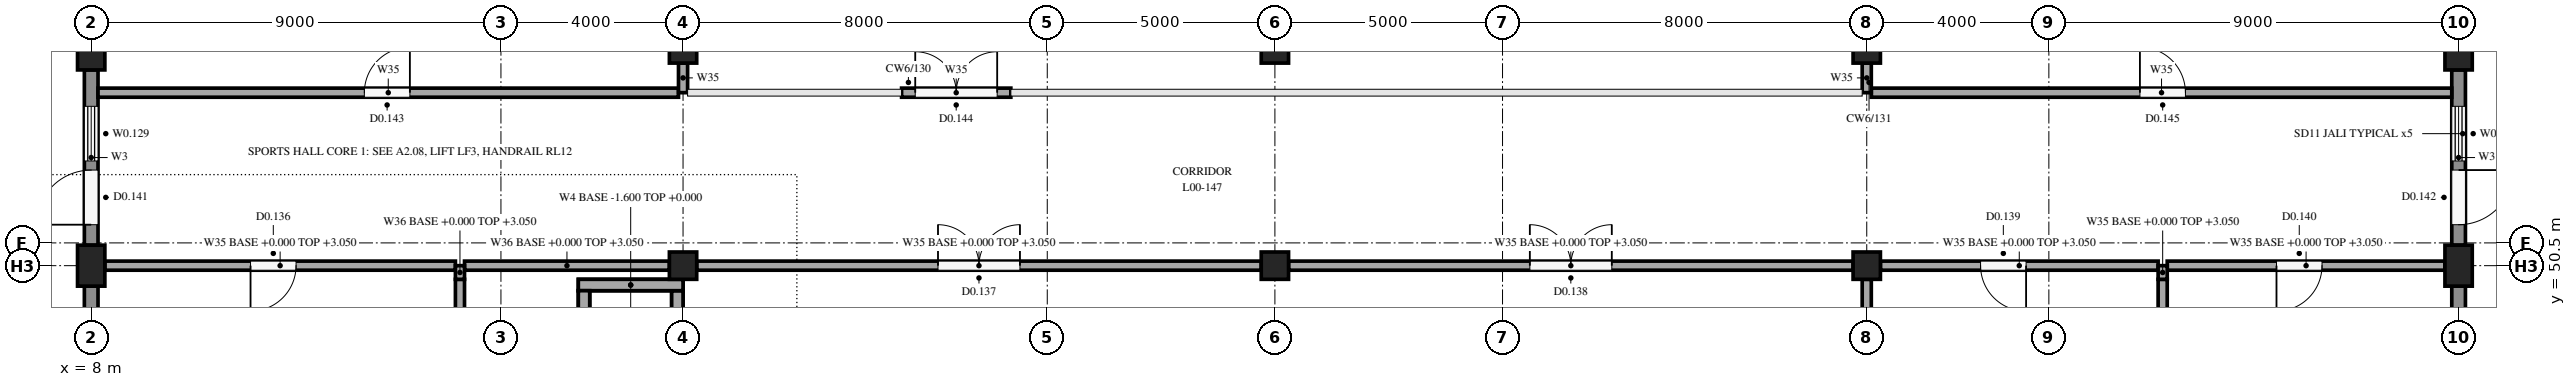
"""IFC4 building model, lengths in metres.
Left out: names, types, materials, properties, quantities, classifications, styles, units other than length and angle.
Written with IfcOpenShell. Run it as: python <this file> out.ifc"""

import sys

from ifc_helpers import new_model, si_unit, direction, frame, frame_2d, origin, origin_2d, place, context, subcontext, project, spatial, rectangle, extrude, element, fill, save


model = new_model("IFC4")
c1 = context("Model", 3, precision=1e-05, world=origin(), true_north=direction((0.0, 1.0)))
c2 = subcontext(c1, "Body", "Model", "MODEL_VIEW")
j1 = project(units=[si_unit("LENGTHUNIT", "METRE"), si_unit("PLANEANGLEUNIT", "RADIAN")], contexts=[c1])
p1 = place(None, origin())
s1 = spatial("IfcSite", under=j1, at=p1, CompositionType="ELEMENT")
p2 = place(p1, origin())
s2 = spatial("IfcBuilding", under=s1, at=p2, CompositionType="ELEMENT")
p3 = place(p2, origin())
s3 = spatial("IfcBuildingStorey", under=s2, at=p3, CompositionType="ELEMENT", Elevation=0.0)
for number, where, z_axis, x_axis in (
    (1, (8.0, 50.5, 0.0), (0.0, 0.0, 1.0), (1.0, 0.0, 0.0)),
    (2, (8.0, 55.25, 0.0), (0.0, 0.0, 1.0), (1.0, 0.0, 0.0)),
    (3, (60.0, 50.5, 0.0), (0.0, 0.0, 1.0), (1.0, 0.0, 0.0)),
    (4, (60.0, 55.25, 0.0), (0.0, 0.0, 1.0), (1.0, 0.0, 0.0)),
):
    element("IfcColumn", number, at=place(p3, frame(where, z_axis=z_axis, x_axis=x_axis)), inside=s3, PredefinedType="COLUMN", context=c2, shape_type="SweptSolid", body=[
        extrude(rectangle(XDim=0.6, YDim=0.9, at=origin_2d()), origin(), (0.0, 0.0, 1.0), 4.5),
    ])
for number, where, z_axis, x_axis in (
    (5, (21.0, 50.5, 0.0), (0.0, 0.0, 1.0), (1.0, 0.0, 0.0)),
    (6, (21.0, 55.25, 0.0), (0.0, 0.0, 1.0), (1.0, 0.0, 0.0)),
    (7, (34.0, 50.5, 0.0), (0.0, 0.0, 1.0), (1.0, 0.0, 0.0)),
    (8, (34.0, 55.25, 0.0), (0.0, 0.0, 1.0), (1.0, 0.0, 0.0)),
    (9, (47.0, 50.5, 0.0), (0.0, 0.0, 1.0), (1.0, 0.0, 0.0)),
    (10, (47.0, 55.25, 0.0), (0.0, 0.0, 1.0), (1.0, 0.0, 0.0)),
):
    element("IfcColumn", number, at=place(p3, frame(where, z_axis=z_axis, x_axis=x_axis)), inside=s3, PredefinedType="COLUMN", context=c2, shape_type="SweptSolid", body=[
        extrude(rectangle(XDim=0.6, YDim=0.6, at=origin_2d()), origin(), (0.0, 0.0, 1.0), 4.5),
    ])
p4 = place(p3, frame((8.0, 46.2, 0.0), z_axis=(0.0, 0.0, 1.0), x_axis=(0.0, 1.0, 0.0)))
e11 = element("IfcWall", 11, at=p4, inside=s3, PredefinedType="SOLIDWALL", context=c2, shape_type="SweptSolid", body=[
    extrude(rectangle(XDim=3.85, YDim=0.3, at=frame_2d((1.925, 0.0))), origin(), (0.0, 0.0, 1.0), 4.15),
])
p5 = place(p4, frame((0.925, 0.0, 1.0)))
e12 = element("IfcOpeningElement", 12, at=p5, cuts=e11, PredefinedType="OPENING", context=c2, shape_type="SweptSolid", body=[
    extrude(rectangle(XDim=2.0, YDim=2.0, at=frame_2d((1.0, 1.0))), frame((0.0, 0.16, 0.0), z_axis=(0.0, -1.0, 0.0), x_axis=(1.0, 0.0, 0.0)), (0.0, 0.0, 1.0), 0.32),
])
p6 = place(p3, frame((8.0, 50.95, 0.0), z_axis=(0.0, 0.0, 1.0), x_axis=(0.0, 1.0, 0.0)))
e13 = element("IfcWall", 13, at=p6, inside=s3, PredefinedType="SOLIDWALL", context=c2, shape_type="SweptSolid", body=[
    extrude(rectangle(XDim=3.85, YDim=0.3, at=frame_2d((1.925, 0.0))), origin(), (0.0, 0.0, 1.0), 4.15),
])
p7 = place(p6, frame((1.85, 0.0, 1.0)))
e14 = element("IfcOpeningElement", 14, at=p7, cuts=e13, PredefinedType="OPENING", context=c2, shape_type="SweptSolid", body=[
    extrude(rectangle(XDim=1.2, YDim=2.0, at=frame_2d((0.6, 1.0))), frame((0.0, 0.16, 0.0), z_axis=(0.0, -1.0, 0.0), x_axis=(1.0, 0.0, 0.0)), (0.0, 0.0, 1.0), 0.32),
])
p8 = place(p6, frame((0.45, 0.0, 0.0)))
e15 = element("IfcOpeningElement", 15, at=p8, cuts=e13, PredefinedType="OPENING", context=c2, shape_type="SweptSolid", body=[
    extrude(rectangle(XDim=1.2, YDim=2.1, at=frame_2d((0.6, 1.05))), frame((0.0, 0.16, 0.0), z_axis=(0.0, -1.0, 0.0), x_axis=(1.0, 0.0, 0.0)), (0.0, 0.0, 1.0), 0.32),
])
p9 = place(p3, frame((60.0, 46.2, 0.0), z_axis=(0.0, 0.0, 1.0), x_axis=(0.0, 1.0, 0.0)))
e16 = element("IfcWall", 16, at=p9, inside=s3, PredefinedType="SOLIDWALL", context=c2, shape_type="SweptSolid", body=[
    extrude(rectangle(XDim=3.85, YDim=0.3, at=frame_2d((1.925, 0.0))), origin(), (0.0, 0.0, 1.0), 4.15),
])
p10 = place(p9, frame((0.925, 0.0, 1.0)))
e17 = element("IfcOpeningElement", 17, at=p10, cuts=e16, PredefinedType="OPENING", context=c2, shape_type="SweptSolid", body=[
    extrude(rectangle(XDim=2.0, YDim=2.0, at=frame_2d((1.0, 1.0))), frame((0.0, 0.16, 0.0), z_axis=(0.0, -1.0, 0.0), x_axis=(1.0, 0.0, 0.0)), (0.0, 0.0, 1.0), 0.32),
])
p11 = place(p3, frame((60.0, 50.95, 0.0), z_axis=(0.0, 0.0, 1.0), x_axis=(0.0, 1.0, 0.0)))
e18 = element("IfcWall", 18, at=p11, inside=s3, PredefinedType="SOLIDWALL", context=c2, shape_type="SweptSolid", body=[
    extrude(rectangle(XDim=3.85, YDim=0.3, at=frame_2d((1.925, 0.0))), origin(), (0.0, 0.0, 1.0), 4.15),
])
p12 = place(p11, frame((1.85, 0.0, 1.0)))
e19 = element("IfcOpeningElement", 19, at=p12, cuts=e18, PredefinedType="OPENING", context=c2, shape_type="SweptSolid", body=[
    extrude(rectangle(XDim=1.2, YDim=2.0, at=frame_2d((0.6, 1.0))), frame((0.0, 0.16, 0.0), z_axis=(0.0, -1.0, 0.0), x_axis=(1.0, 0.0, 0.0)), (0.0, 0.0, 1.0), 0.32),
])
p13 = place(p11, frame((0.45, 0.0, 0.0)))
e20 = element("IfcOpeningElement", 20, at=p13, cuts=e18, PredefinedType="OPENING", context=c2, shape_type="SweptSolid", body=[
    extrude(rectangle(XDim=1.2, YDim=2.1, at=frame_2d((0.6, 1.05))), frame((0.0, 0.16, 0.0), z_axis=(0.0, -1.0, 0.0), x_axis=(1.0, 0.0, 0.0)), (0.0, 0.0, 1.0), 0.32),
])
p14 = place(p3, frame((18.7, 50.075, -1.6), z_axis=(0.0, 0.0, 1.0), x_axis=(1.0, 0.0, 0.0)))
e21 = element("IfcWall", 21, at=p14, inside=s3, PredefinedType="SOLIDWALL", context=c2, shape_type="SweptSolid", body=[
    extrude(rectangle(XDim=2.3, YDim=0.25, at=frame_2d((1.15, 0.0))), origin(), (0.0, 0.0, 1.0), 1.6),
])
for number, where, z_axis, x_axis in (
    (22, (18.825, 47.55, -1.6), (0.0, 0.0, 1.0), (0.0, 1.0, 0.0)),
    (23, (20.875, 47.55, -1.6), (0.0, 0.0, 1.0), (0.0, 1.0, 0.0)),
):
    element("IfcWall", number, at=place(p3, frame(where, z_axis=z_axis, x_axis=x_axis)), inside=s3, PredefinedType="SOLIDWALL", context=c2, shape_type="SweptSolid", body=[
        extrude(rectangle(XDim=2.4, YDim=0.25, at=frame_2d((1.2, 0.0))), origin(), (0.0, 0.0, 1.0), 1.6),
    ])
p15 = place(p3, frame((18.7, 50.075, 0.0), z_axis=(0.0, 0.0, 1.0), x_axis=(1.0, 0.0, 0.0)))
e24 = element("IfcWall", 24, at=p15, inside=s3, PredefinedType="SOLIDWALL", context=c2, shape_type="SweptSolid", body=[
    extrude(rectangle(XDim=2.3, YDim=0.25, at=frame_2d((1.15, 0.0))), origin(), (0.0, 0.0, 1.0), 4.15),
])
for number, where, z_axis, x_axis in (
    (25, (18.825, 47.55, 0.0), (0.0, 0.0, 1.0), (0.0, 1.0, 0.0)),
    (26, (20.875, 47.55, 0.0), (0.0, 0.0, 1.0), (0.0, 1.0, 0.0)),
):
    element("IfcWall", number, at=place(p3, frame(where, z_axis=z_axis, x_axis=x_axis)), inside=s3, PredefinedType="SOLIDWALL", context=c2, shape_type="SweptSolid", body=[
        extrude(rectangle(XDim=2.4, YDim=0.25, at=frame_2d((1.2, 0.0))), origin(), (0.0, 0.0, 1.0), 4.15),
    ])
p16 = place(p3, frame((8.3, 50.5, 0.0), z_axis=(0.0, 0.0, 1.0), x_axis=(1.0, 0.0, 0.0)))
e27 = element("IfcWall", 27, at=p16, inside=s3, PredefinedType="PARTITIONING", context=c2, shape_type="SweptSolid", body=[
    extrude(rectangle(XDim=7.7, YDim=0.2, at=frame_2d((3.85, 0.0))), origin(), (0.0, 0.0, 1.0), 3.05),
])
p17 = place(p16, frame((3.2, 0.0, 0.0)))
e28 = element("IfcOpeningElement", 28, at=p17, cuts=e27, PredefinedType="OPENING", context=c2, shape_type="SweptSolid", body=[
    extrude(rectangle(XDim=1.0, YDim=2.1, at=frame_2d((0.5, 1.05))), frame((0.0, 0.11, 0.0), z_axis=(0.0, -1.0, 0.0), x_axis=(1.0, 0.0, 0.0)), (0.0, 0.0, 1.0), 0.22),
])
p18 = place(p3, frame((16.2, 50.5, 0.0), z_axis=(0.0, 0.0, 1.0), x_axis=(1.0, 0.0, 0.0)))
e29 = element("IfcWall", 29, at=p18, inside=s3, PredefinedType="PARTITIONING", context=c2, shape_type="SweptSolid", body=[
    extrude(rectangle(XDim=4.5, YDim=0.2, at=frame_2d((2.25, 0.0))), origin(), (0.0, 0.0, 1.0), 3.05),
])
p19 = place(p3, frame((21.3, 50.5, 0.0), z_axis=(0.0, 0.0, 1.0), x_axis=(1.0, 0.0, 0.0)))
e30 = element("IfcWall", 30, at=p19, inside=s3, PredefinedType="PARTITIONING", context=c2, shape_type="SweptSolid", body=[
    extrude(rectangle(XDim=12.4, YDim=0.2, at=frame_2d((6.2, 0.0))), origin(), (0.0, 0.0, 1.0), 3.05),
])
p20 = place(p19, frame((5.3, 0.0, 0.0)))
e31 = element("IfcOpeningElement", 31, at=p20, cuts=e30, PredefinedType="OPENING", context=c2, shape_type="SweptSolid", body=[
    extrude(rectangle(XDim=1.8, YDim=2.1, at=frame_2d((0.9, 1.05))), frame((0.0, 0.11, 0.0), z_axis=(0.0, -1.0, 0.0), x_axis=(1.0, 0.0, 0.0)), (0.0, 0.0, 1.0), 0.22),
])
p21 = place(p3, frame((34.3, 50.5, 0.0), z_axis=(0.0, 0.0, 1.0), x_axis=(1.0, 0.0, 0.0)))
e32 = element("IfcWall", 32, at=p21, inside=s3, PredefinedType="PARTITIONING", context=c2, shape_type="SweptSolid", body=[
    extrude(rectangle(XDim=12.4, YDim=0.2, at=frame_2d((6.2, 0.0))), origin(), (0.0, 0.0, 1.0), 3.05),
])
p22 = place(p21, frame((5.3, 0.0, 0.0)))
e33 = element("IfcOpeningElement", 33, at=p22, cuts=e32, PredefinedType="OPENING", context=c2, shape_type="SweptSolid", body=[
    extrude(rectangle(XDim=1.8, YDim=2.1, at=frame_2d((0.9, 1.05))), frame((0.0, 0.11, 0.0), z_axis=(0.0, -1.0, 0.0), x_axis=(1.0, 0.0, 0.0)), (0.0, 0.0, 1.0), 0.22),
])
p23 = place(p3, frame((47.3, 50.5, 0.0), z_axis=(0.0, 0.0, 1.0), x_axis=(1.0, 0.0, 0.0)))
e34 = element("IfcWall", 34, at=p23, inside=s3, PredefinedType="PARTITIONING", context=c2, shape_type="SweptSolid", body=[
    extrude(rectangle(XDim=6.1, YDim=0.2, at=frame_2d((3.05, 0.0))), origin(), (0.0, 0.0, 1.0), 3.05),
])
p24 = place(p23, frame((2.2, 0.0, 0.0)))
e35 = element("IfcOpeningElement", 35, at=p24, cuts=e34, PredefinedType="OPENING", context=c2, shape_type="SweptSolid", body=[
    extrude(rectangle(XDim=1.0, YDim=2.1, at=frame_2d((0.5, 1.05))), frame((0.0, 0.11, 0.0), z_axis=(0.0, -1.0, 0.0), x_axis=(1.0, 0.0, 0.0)), (0.0, 0.0, 1.0), 0.22),
])
p25 = place(p3, frame((53.6, 50.5, 0.0), z_axis=(0.0, 0.0, 1.0), x_axis=(1.0, 0.0, 0.0)))
e36 = element("IfcWall", 36, at=p25, inside=s3, PredefinedType="PARTITIONING", context=c2, shape_type="SweptSolid", body=[
    extrude(rectangle(XDim=6.1, YDim=0.2, at=frame_2d((3.05, 0.0))), origin(), (0.0, 0.0, 1.0), 3.05),
])
p26 = place(p25, frame((2.4, 0.0, 0.0)))
e37 = element("IfcOpeningElement", 37, at=p26, cuts=e36, PredefinedType="OPENING", context=c2, shape_type="SweptSolid", body=[
    extrude(rectangle(XDim=1.0, YDim=2.1, at=frame_2d((0.5, 1.05))), frame((0.0, 0.11, 0.0), z_axis=(0.0, -1.0, 0.0), x_axis=(1.0, 0.0, 0.0)), (0.0, 0.0, 1.0), 0.22),
])
p27 = place(p3, frame((8.15, 54.3, 0.0), z_axis=(0.0, 0.0, 1.0), x_axis=(1.0, 0.0, 0.0)))
e38 = element("IfcWall", 38, at=p27, inside=s3, PredefinedType="PARTITIONING", context=c2, shape_type="SweptSolid", body=[
    extrude(rectangle(XDim=12.75, YDim=0.2, at=frame_2d((6.375, 0.0))), origin(), (0.0, 0.0, 1.0), 4.15),
])
p28 = place(p27, frame((5.85, 0.0, 0.0)))
e39 = element("IfcOpeningElement", 39, at=p28, cuts=e38, PredefinedType="OPENING", context=c2, shape_type="SweptSolid", body=[
    extrude(rectangle(XDim=1.0, YDim=2.1, at=frame_2d((0.5, 1.05))), frame((0.0, 0.11, 0.0), z_axis=(0.0, -1.0, 0.0), x_axis=(1.0, 0.0, 0.0)), (0.0, 0.0, 1.0), 0.22),
])
p29 = place(p3, frame((25.8, 54.3, 0.0), z_axis=(0.0, 0.0, 1.0), x_axis=(1.0, 0.0, 0.0)))
e40 = element("IfcWall", 40, at=p29, inside=s3, PredefinedType="PARTITIONING", context=c2, shape_type="SweptSolid", body=[
    extrude(rectangle(XDim=2.4, YDim=0.2, at=frame_2d((1.2, 0.0))), origin(), (0.0, 0.0, 1.0), 4.15),
])
p30 = place(p29, frame((0.3, 0.0, 0.0)))
e41 = element("IfcOpeningElement", 41, at=p30, cuts=e40, PredefinedType="OPENING", context=c2, shape_type="SweptSolid", body=[
    extrude(rectangle(XDim=1.8, YDim=2.1, at=frame_2d((0.9, 1.05))), frame((0.0, 0.11, 0.0), z_axis=(0.0, -1.0, 0.0), x_axis=(1.0, 0.0, 0.0)), (0.0, 0.0, 1.0), 0.22),
])
p31 = place(p3, frame((47.1, 54.3, 0.0), z_axis=(0.0, 0.0, 1.0), x_axis=(1.0, 0.0, 0.0)))
e42 = element("IfcWall", 42, at=p31, inside=s3, PredefinedType="PARTITIONING", context=c2, shape_type="SweptSolid", body=[
    extrude(rectangle(XDim=12.75, YDim=0.2, at=frame_2d((6.375, 0.0))), origin(), (0.0, 0.0, 1.0), 4.15),
])
p32 = place(p31, frame((5.9, 0.0, 0.0)))
e43 = element("IfcOpeningElement", 43, at=p32, cuts=e42, PredefinedType="OPENING", context=c2, shape_type="SweptSolid", body=[
    extrude(rectangle(XDim=1.0, YDim=2.1, at=frame_2d((0.5, 1.05))), frame((0.0, 0.11, 0.0), z_axis=(0.0, -1.0, 0.0), x_axis=(1.0, 0.0, 0.0)), (0.0, 0.0, 1.0), 0.22),
])
p33 = place(p3, frame((16.1, 46.05, 0.0), z_axis=(0.0, 0.0, 1.0), x_axis=(0.0, 1.0, 0.0)))
e44 = element("IfcWall", 44, at=p33, inside=s3, PredefinedType="PARTITIONING", context=c2, shape_type="SweptSolid", body=[
    extrude(rectangle(XDim=4.15, YDim=0.2, at=frame_2d((2.075, 0.0))), origin(), (0.0, 0.0, 1.0), 4.15),
])
p34 = place(p3, frame((16.1, 50.2, 0.0), z_axis=(0.0, 0.0, 1.0), x_axis=(0.0, 1.0, 0.0)))
e45 = element("IfcWall", 45, at=p34, inside=s3, PredefinedType="PARTITIONING", context=c2, shape_type="SweptSolid", body=[
    extrude(rectangle(XDim=0.3, YDim=0.2, at=frame_2d((0.15, 0.0))), origin(), (0.0, 0.0, 1.0), 3.05),
])
p35 = place(p3, frame((21.0, 54.3, 0.0), z_axis=(0.0, 0.0, 1.0), x_axis=(0.0, 1.0, 0.0)))
e46 = element("IfcWall", 46, at=p35, inside=s3, PredefinedType="PARTITIONING", context=c2, shape_type="SweptSolid", body=[
    extrude(rectangle(XDim=0.65, YDim=0.2, at=frame_2d((0.325, 0.0))), origin(), (0.0, 0.0, 1.0), 4.15),
])
p36 = place(p3, frame((47.0, 46.05, 0.0), z_axis=(0.0, 0.0, 1.0), x_axis=(0.0, 1.0, 0.0)))
e47 = element("IfcWall", 47, at=p36, inside=s3, PredefinedType="PARTITIONING", context=c2, shape_type="SweptSolid", body=[
    extrude(rectangle(XDim=4.15, YDim=0.2, at=frame_2d((2.075, 0.0))), origin(), (0.0, 0.0, 1.0), 4.15),
])
p37 = place(p3, frame((47.0, 54.3, 0.0), z_axis=(0.0, 0.0, 1.0), x_axis=(0.0, 1.0, 0.0)))
e48 = element("IfcWall", 48, at=p37, inside=s3, PredefinedType="PARTITIONING", context=c2, shape_type="SweptSolid", body=[
    extrude(rectangle(XDim=0.65, YDim=0.2, at=frame_2d((0.325, 0.0))), origin(), (0.0, 0.0, 1.0), 4.15),
])
p38 = place(p3, frame((53.5, 46.05, 0.0), z_axis=(0.0, 0.0, 1.0), x_axis=(0.0, 1.0, 0.0)))
e49 = element("IfcWall", 49, at=p38, inside=s3, PredefinedType="PARTITIONING", context=c2, shape_type="SweptSolid", body=[
    extrude(rectangle(XDim=4.15, YDim=0.2, at=frame_2d((2.075, 0.0))), origin(), (0.0, 0.0, 1.0), 4.15),
])
p39 = place(p3, frame((53.5, 50.2, 0.0), z_axis=(0.0, 0.0, 1.0), x_axis=(0.0, 1.0, 0.0)))
e50 = element("IfcWall", 50, at=p39, inside=s3, PredefinedType="PARTITIONING", context=c2, shape_type="SweptSolid", body=[
    extrude(rectangle(XDim=0.3, YDim=0.2, at=frame_2d((0.15, 0.0))), origin(), (0.0, 0.0, 1.0), 3.05),
])
p40 = place(p7, origin())
e51 = element("IfcWindow", 51, at=p40, inside=s3, PartitioningType="SINGLE_PANEL", PredefinedType="WINDOW", context=c2, shape_type="SweptSolid", body=[
    extrude(rectangle(XDim=1.2, YDim=2.0, at=frame_2d((0.6, 1.0))), frame((0.0, 0.03, 0.0), z_axis=(0.0, -1.0, 0.0), x_axis=(1.0, 0.0, 0.0)), (0.0, 0.0, 1.0), 0.06),
])
fill(e14, e51)
p41 = place(p12, origin())
e52 = element("IfcWindow", 52, at=p41, inside=s3, PartitioningType="SINGLE_PANEL", PredefinedType="WINDOW", context=c2, shape_type="SweptSolid", body=[
    extrude(rectangle(XDim=1.2, YDim=2.0, at=frame_2d((0.6, 1.0))), frame((0.0, 0.03, 0.0), z_axis=(0.0, -1.0, 0.0), x_axis=(1.0, 0.0, 0.0)), (0.0, 0.0, 1.0), 0.06),
])
fill(e19, e52)
p42 = place(p8, origin())
e53 = element("IfcDoor", 53, at=p42, inside=s3, OperationType="SINGLE_SWING_LEFT", PredefinedType="DOOR", context=c2, shape_type="SweptSolid", body=[
    extrude(rectangle(XDim=1.2, YDim=2.1, at=frame_2d((0.6, 1.05))), frame((0.0, 0.025, 0.0), z_axis=(0.0, -1.0, 0.0), x_axis=(1.0, 0.0, 0.0)), (0.0, 0.0, 1.0), 0.05),
])
fill(e15, e53)
p43 = place(p13, frame((1.2, 0.0, 0.0), z_axis=(0.0, 0.0, 1.0), x_axis=(-1.0, 0.0, 0.0)))
e54 = element("IfcDoor", 54, at=p43, inside=s3, OperationType="SINGLE_SWING_RIGHT", PredefinedType="DOOR", context=c2, shape_type="SweptSolid", body=[
    extrude(rectangle(XDim=1.2, YDim=2.1, at=frame_2d((0.6, 1.05))), frame((0.0, 0.025, 0.0), z_axis=(0.0, -1.0, 0.0), x_axis=(1.0, 0.0, 0.0)), (0.0, 0.0, 1.0), 0.05),
])
fill(e20, e54)
p44 = place(p20, origin())
e55 = element("IfcDoor", 55, at=p44, inside=s3, OperationType="DOUBLE_DOOR_SINGLE_SWING", PredefinedType="DOOR", context=c2, shape_type="SweptSolid", body=[
    extrude(rectangle(XDim=1.8, YDim=2.1, at=frame_2d((0.9, 1.05))), frame((0.0, 0.025, 0.0), z_axis=(0.0, -1.0, 0.0), x_axis=(1.0, 0.0, 0.0)), (0.0, 0.0, 1.0), 0.05),
])
fill(e31, e55)
p45 = place(p22, origin())
e56 = element("IfcDoor", 56, at=p45, inside=s3, OperationType="DOUBLE_DOOR_SINGLE_SWING", PredefinedType="DOOR", context=c2, shape_type="SweptSolid", body=[
    extrude(rectangle(XDim=1.8, YDim=2.1, at=frame_2d((0.9, 1.05))), frame((0.0, 0.025, 0.0), z_axis=(0.0, -1.0, 0.0), x_axis=(1.0, 0.0, 0.0)), (0.0, 0.0, 1.0), 0.05),
])
fill(e33, e56)
p46 = place(p17, frame((1.0, 0.0, 0.0), z_axis=(0.0, 0.0, 1.0), x_axis=(-1.0, 0.0, 0.0)))
e57 = element("IfcDoor", 57, at=p46, inside=s3, OperationType="SINGLE_SWING_LEFT", PredefinedType="DOOR", context=c2, shape_type="SweptSolid", body=[
    extrude(rectangle(XDim=1.0, YDim=2.1, at=frame_2d((0.5, 1.05))), frame((0.0, 0.025, 0.0), z_axis=(0.0, -1.0, 0.0), x_axis=(1.0, 0.0, 0.0)), (0.0, 0.0, 1.0), 0.05),
])
fill(e28, e57)
p47 = place(p24, frame((1.0, 0.0, 0.0), z_axis=(0.0, 0.0, 1.0), x_axis=(-1.0, 0.0, 0.0)))
e58 = element("IfcDoor", 58, at=p47, inside=s3, OperationType="SINGLE_SWING_RIGHT", PredefinedType="DOOR", context=c2, shape_type="SweptSolid", body=[
    extrude(rectangle(XDim=1.0, YDim=2.1, at=frame_2d((0.5, 1.05))), frame((0.0, 0.025, 0.0), z_axis=(0.0, -1.0, 0.0), x_axis=(1.0, 0.0, 0.0)), (0.0, 0.0, 1.0), 0.05),
])
fill(e35, e58)
p48 = place(p26, frame((1.0, 0.0, 0.0), z_axis=(0.0, 0.0, 1.0), x_axis=(-1.0, 0.0, 0.0)))
e59 = element("IfcDoor", 59, at=p48, inside=s3, OperationType="SINGLE_SWING_LEFT", PredefinedType="DOOR", context=c2, shape_type="SweptSolid", body=[
    extrude(rectangle(XDim=1.0, YDim=2.1, at=frame_2d((0.5, 1.05))), frame((0.0, 0.025, 0.0), z_axis=(0.0, -1.0, 0.0), x_axis=(1.0, 0.0, 0.0)), (0.0, 0.0, 1.0), 0.05),
])
fill(e37, e59)
p49 = place(p28, origin())
e60 = element("IfcDoor", 60, at=p49, inside=s3, OperationType="SINGLE_SWING_RIGHT", PredefinedType="DOOR", context=c2, shape_type="SweptSolid", body=[
    extrude(rectangle(XDim=1.0, YDim=2.1, at=frame_2d((0.5, 1.05))), frame((0.0, 0.025, 0.0), z_axis=(0.0, -1.0, 0.0), x_axis=(1.0, 0.0, 0.0)), (0.0, 0.0, 1.0), 0.05),
])
fill(e39, e60)
p50 = place(p30, origin())
e61 = element("IfcDoor", 61, at=p50, inside=s3, OperationType="DOUBLE_DOOR_SINGLE_SWING", PredefinedType="DOOR", context=c2, shape_type="SweptSolid", body=[
    extrude(rectangle(XDim=1.8, YDim=2.1, at=frame_2d((0.9, 1.05))), frame((0.0, 0.025, 0.0), z_axis=(0.0, -1.0, 0.0), x_axis=(1.0, 0.0, 0.0)), (0.0, 0.0, 1.0), 0.05),
])
fill(e41, e61)
p51 = place(p32, origin())
e62 = element("IfcDoor", 62, at=p51, inside=s3, OperationType="SINGLE_SWING_LEFT", PredefinedType="DOOR", context=c2, shape_type="SweptSolid", body=[
    extrude(rectangle(XDim=1.0, YDim=2.1, at=frame_2d((0.5, 1.05))), frame((0.0, 0.025, 0.0), z_axis=(0.0, -1.0, 0.0), x_axis=(1.0, 0.0, 0.0)), (0.0, 0.0, 1.0), 0.05),
])
fill(e43, e62)
save(model, sys.argv[1])
